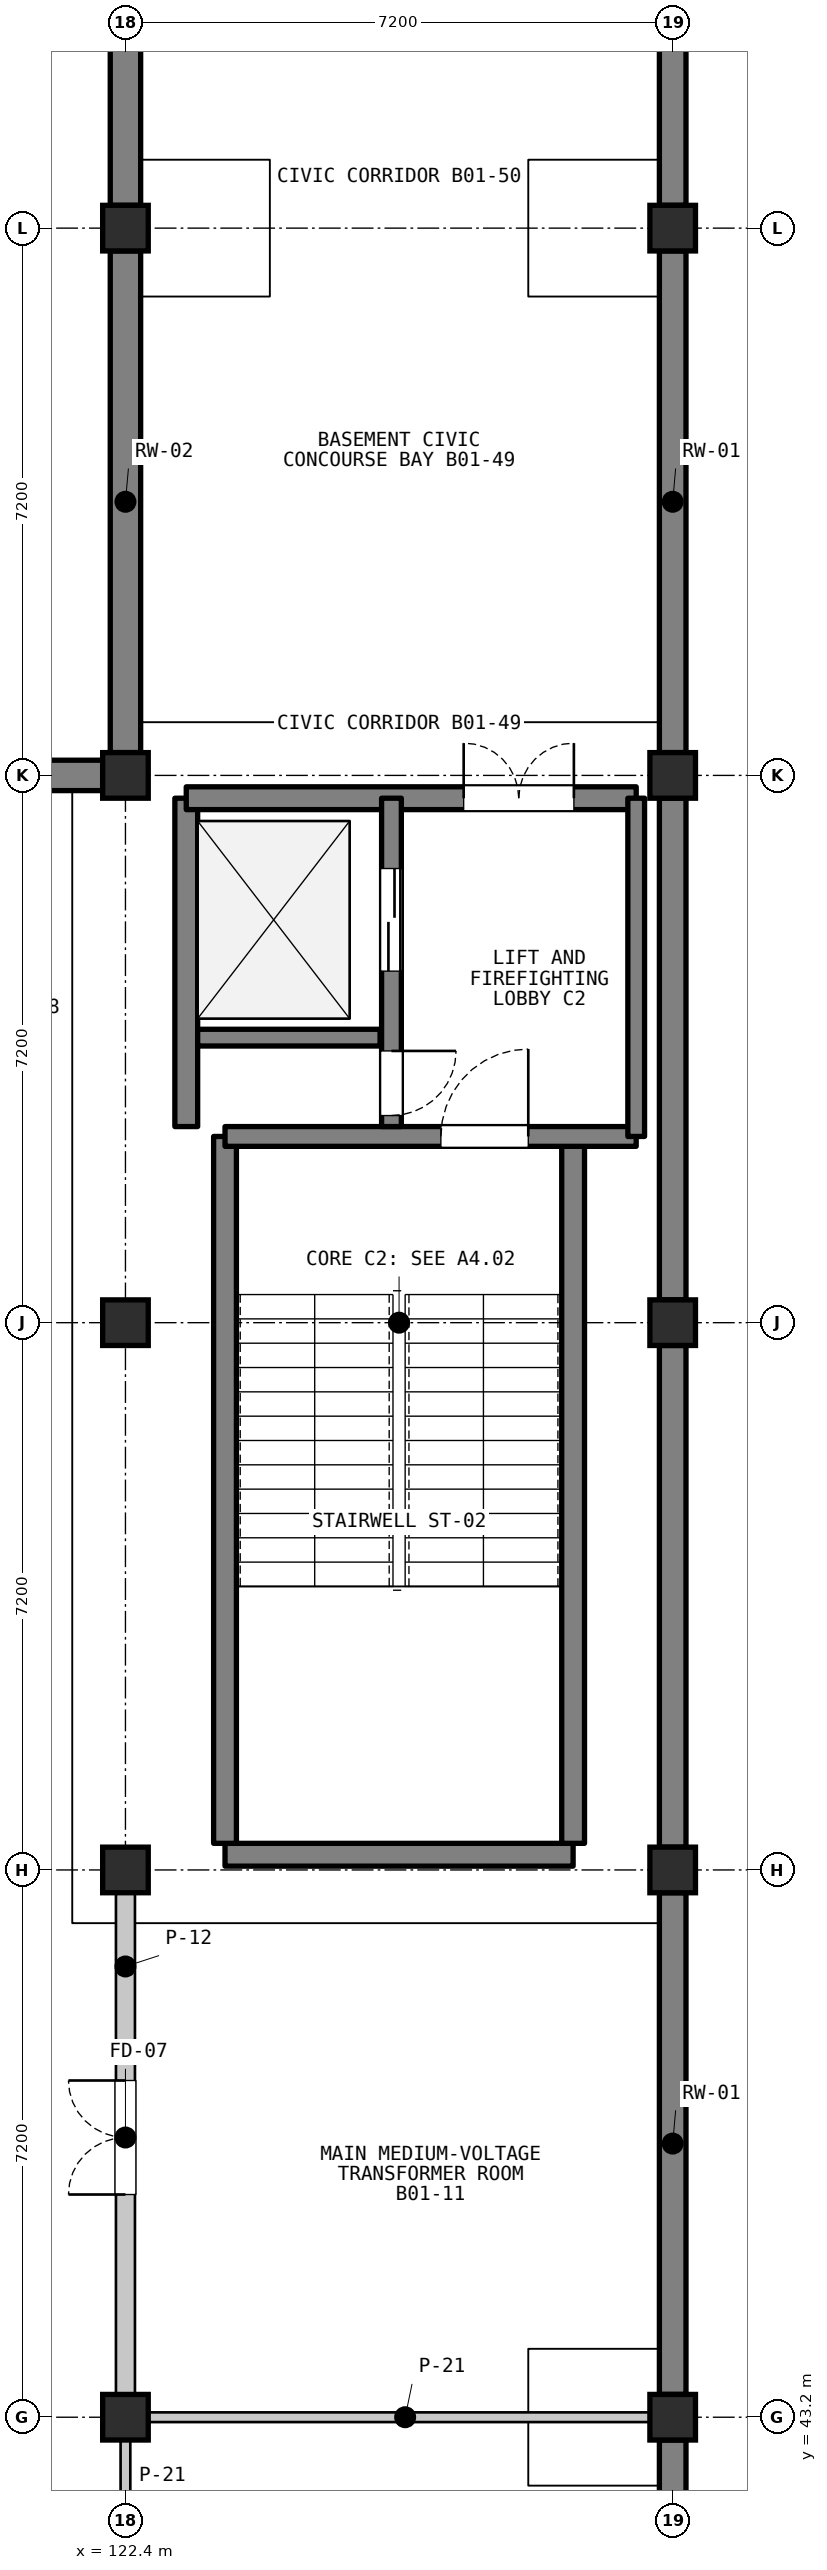
"""IFC4 building model, lengths in metres.
Left out: names, types, materials, properties, quantities, classifications, styles, units other than length and angle.
Written with IfcOpenShell. Run it as: python <this file> out.ifc"""

import sys

from ifc_helpers import new_model, si_unit, direction, frame, frame_2d, origin, origin_2d, place, context, subcontext, project, spatial, rectangle, extrude, element, fill, save


model = new_model("IFC4")
c1 = context("Model", 3, precision=1e-05, world=origin(), true_north=direction((0.0, 1.0)))
c2 = subcontext(c1, "Body", "Model", "MODEL_VIEW")
j1 = project(units=[si_unit("LENGTHUNIT", "METRE"), si_unit("PLANEANGLEUNIT", "RADIAN")], contexts=[c1])
p1 = place(None, origin())
s1 = spatial("IfcSite", under=j1, at=p1, CompositionType="ELEMENT")
p2 = place(p1, origin())
s2 = spatial("IfcBuilding", under=s1, at=p2, CompositionType="ELEMENT")
p3 = place(p2, frame((0.0, 0.0, -4.2)))
s3 = spatial("IfcBuildingStorey", under=s2, at=p3, CompositionType="ELEMENT", Elevation=-4.2)
p4 = place(p3, frame((115.5, 64.8, 0.0), z_axis=(0.0, 0.0, 1.0), x_axis=(1.0, 0.0, 0.0)))
e1 = element("IfcWall", 1, at=p4, inside=s3, PredefinedType="USERDEFINED", context=c2, shape_type="SweptSolid", body=[
    extrude(rectangle(XDim=6.6, YDim=0.4, at=frame_2d((3.3, 0.0))), origin(), (0.0, 0.0, 1.0), 3.98),
])
p5 = place(p3, frame((129.6, 36.3, 0.0), z_axis=(0.0, 0.0, 1.0), x_axis=(0.0, 1.0, 0.0)))
e2 = element("IfcWall", 2, at=p5, inside=s3, PredefinedType="USERDEFINED", context=c2, shape_type="SweptSolid", body=[
    extrude(rectangle(XDim=6.6, YDim=0.35, at=frame_2d((3.3, 0.0))), origin(), (0.0, 0.0, 1.0), 3.98),
])
for number, where, z_axis, x_axis in (
    (3, (129.6, 43.5, 0.0), (0.0, 0.0, 1.0), (0.0, 1.0, 0.0)),
    (4, (129.6, 50.7, 0.0), (0.0, 0.0, 1.0), (0.0, 1.0, 0.0)),
    (5, (129.6, 57.9, 0.0), (0.0, 0.0, 1.0), (0.0, 1.0, 0.0)),
):
    element("IfcWall", number, at=place(p3, frame(where, z_axis=z_axis, x_axis=x_axis)), inside=s3, PredefinedType="USERDEFINED", context=c2, shape_type="SweptSolid", body=[
        extrude(rectangle(XDim=6.6, YDim=0.35, at=frame_2d((3.3, 0.0))), origin(), (0.0, 0.0, 1.0), 3.98),
    ])
p6 = place(p3, frame((122.4, 65.1, 0.0), z_axis=(0.0, 0.0, 1.0), x_axis=(0.0, 1.0, 0.0)))
e6 = element("IfcWall", 6, at=p6, inside=s3, PredefinedType="USERDEFINED", context=c2, shape_type="SweptSolid", body=[
    extrude(rectangle(XDim=6.6, YDim=0.4, at=frame_2d((3.3, 0.0))), origin(), (0.0, 0.0, 1.0), 3.98),
])
p7 = place(p3, frame((129.6, 65.1, 0.0), z_axis=(0.0, 0.0, 1.0), x_axis=(0.0, 1.0, 0.0)))
e7 = element("IfcWall", 7, at=p7, inside=s3, PredefinedType="USERDEFINED", context=c2, shape_type="SweptSolid", body=[
    extrude(rectangle(XDim=6.6, YDim=0.35, at=frame_2d((3.3, 0.0))), origin(), (0.0, 0.0, 1.0), 3.98),
])
p8 = place(p3, frame((122.4, 72.3, 0.0), z_axis=(0.0, 0.0, 1.0), x_axis=(0.0, 1.0, 0.0)))
e8 = element("IfcWall", 8, at=p8, inside=s3, PredefinedType="USERDEFINED", context=c2, shape_type="SweptSolid", body=[
    extrude(rectangle(XDim=6.6, YDim=0.4, at=frame_2d((3.3, 0.0))), origin(), (0.0, 0.0, 1.0), 3.98),
])
p9 = place(p3, frame((129.6, 72.3, 0.0), z_axis=(0.0, 0.0, 1.0), x_axis=(0.0, 1.0, 0.0)))
e9 = element("IfcWall", 9, at=p9, inside=s3, PredefinedType="USERDEFINED", context=c2, shape_type="SweptSolid", body=[
    extrude(rectangle(XDim=6.6, YDim=0.35, at=frame_2d((3.3, 0.0))), origin(), (0.0, 0.0, 1.0), 3.98),
])
for number, where, z_axis, x_axis in (
    (10, (122.4, 43.2, 0.0), (0.0, 0.0, 1.0), (1.0, 0.0, 0.0)),
    (11, (122.4, 50.4, 0.0), (0.0, 0.0, 1.0), (1.0, 0.0, 0.0)),
    (12, (122.4, 57.6, 0.0), (0.0, 0.0, 1.0), (1.0, 0.0, 0.0)),
    (13, (122.4, 64.8, 0.0), (0.0, 0.0, 1.0), (1.0, 0.0, 0.0)),
    (14, (122.4, 72.0, 0.0), (0.0, 0.0, 1.0), (1.0, 0.0, 0.0)),
    (15, (129.6, 43.2, 0.0), (0.0, 0.0, 1.0), (1.0, 0.0, 0.0)),
    (16, (129.6, 50.4, 0.0), (0.0, 0.0, 1.0), (1.0, 0.0, 0.0)),
    (17, (129.6, 57.6, 0.0), (0.0, 0.0, 1.0), (1.0, 0.0, 0.0)),
    (18, (129.6, 64.8, 0.0), (0.0, 0.0, 1.0), (1.0, 0.0, 0.0)),
    (19, (129.6, 72.0, 0.0), (0.0, 0.0, 1.0), (1.0, 0.0, 0.0)),
):
    element("IfcColumn", number, at=place(p3, frame(where, z_axis=z_axis, x_axis=x_axis)), inside=s3, PredefinedType="COLUMN", context=c2, shape_type="SweptSolid", body=[
        extrude(rectangle(XDim=0.6, YDim=0.6, at=origin_2d()), origin(), (0.0, 0.0, 1.0), 4.2),
    ])
p10 = place(p3, frame((123.71, 50.6, 0.0), z_axis=(0.0, 0.0, 1.0), x_axis=(1.0, 0.0, 0.0)))
e20 = element("IfcWall", 20, at=p10, inside=s3, PredefinedType="SHEAR", context=c2, shape_type="SweptSolid", body=[
    extrude(rectangle(XDim=4.58, YDim=0.3, at=frame_2d((2.29, 0.0))), origin(), (0.0, 0.0, 1.0), 3.98),
])
for number, where, z_axis, x_axis in (
    (21, (123.71, 50.75, 0.0), (0.0, 0.0, 1.0), (0.0, 1.0, 0.0)),
    (22, (128.29, 50.75, 0.0), (0.0, 0.0, 1.0), (0.0, 1.0, 0.0)),
):
    element("IfcWall", number, at=place(p3, frame(where, z_axis=z_axis, x_axis=x_axis)), inside=s3, PredefinedType="SHEAR", context=c2, shape_type="SweptSolid", body=[
        extrude(rectangle(XDim=9.3, YDim=0.3, at=frame_2d((4.65, 0.0))), origin(), (0.0, 0.0, 1.0), 3.98),
    ])
p11 = place(p3, frame((123.71, 60.05, 0.0), z_axis=(0.0, 0.0, 1.0), x_axis=(1.0, 0.0, 0.0)))
e23 = element("IfcWall", 23, at=p11, inside=s3, PredefinedType="SHEAR", context=c2, shape_type="SweptSolid", body=[
    extrude(rectangle(XDim=5.41, YDim=0.26, at=frame_2d((2.705, 0.0))), origin(), (0.0, 0.0, 1.0), 3.98),
])
p12 = place(p11, frame((2.84, 0.0, 0.0)))
e24 = element("IfcOpeningElement", 24, at=p12, cuts=e23, PredefinedType="OPENING", context=c2, shape_type="SweptSolid", body=[
    extrude(rectangle(XDim=1.15, YDim=2.15, at=frame_2d((0.575, 1.075))), frame((0.0, 0.14, 0.0), z_axis=(0.0, -1.0, 0.0), x_axis=(1.0, 0.0, 0.0)), (0.0, 0.0, 1.0), 0.28),
])
p13 = place(p3, frame((123.2, 60.18, 0.0), z_axis=(0.0, 0.0, 1.0), x_axis=(0.0, 1.0, 0.0)))
e25 = element("IfcWall", 25, at=p13, inside=s3, PredefinedType="SHEAR", context=c2, shape_type="SweptSolid", body=[
    extrude(rectangle(XDim=4.32, YDim=0.3, at=frame_2d((2.16, 0.0))), origin(), (0.0, 0.0, 1.0), 3.98),
])
p14 = place(p3, frame((123.2, 64.5, 0.0), z_axis=(0.0, 0.0, 1.0), x_axis=(1.0, 0.0, 0.0)))
e26 = element("IfcWall", 26, at=p14, inside=s3, PredefinedType="SHEAR", context=c2, shape_type="SweptSolid", body=[
    extrude(rectangle(XDim=5.92, YDim=0.3, at=frame_2d((2.96, 0.0))), origin(), (0.0, 0.0, 1.0), 3.98),
])
p15 = place(p14, frame((3.65, 0.0, 0.0)))
e27 = element("IfcOpeningElement", 27, at=p15, cuts=e26, PredefinedType="OPENING", context=c2, shape_type="SweptSolid", body=[
    extrude(rectangle(XDim=1.45, YDim=2.2, at=frame_2d((0.725, 1.1))), frame((0.0, 0.16, 0.0), z_axis=(0.0, -1.0, 0.0), x_axis=(1.0, 0.0, 0.0)), (0.0, 0.0, 1.0), 0.32),
])
p16 = place(p3, frame((123.35, 61.35, 0.0), z_axis=(0.0, 0.0, 1.0), x_axis=(1.0, 0.0, 0.0)))
e28 = element("IfcWall", 28, at=p16, inside=s3, PredefinedType="SHEAR", context=c2, shape_type="SweptSolid", body=[
    extrude(rectangle(XDim=2.4, YDim=0.22, at=frame_2d((1.2, 0.0))), origin(), (0.0, 0.0, 1.0), 3.98),
])
p17 = place(p3, frame((125.9, 64.5, 0.0), z_axis=(0.0, 0.0, 1.0), x_axis=(0.0, -1.0, 0.0)))
e29 = element("IfcWall", 29, at=p17, inside=s3, PredefinedType="SHEAR", context=c2, shape_type="SweptSolid", body=[
    extrude(rectangle(XDim=4.32, YDim=0.26, at=frame_2d((2.16, 0.0))), origin(), (0.0, 0.0, 1.0), 3.98),
])
p18 = place(p17, frame((0.925, 0.0, 0.0)))
e30 = element("IfcOpeningElement", 30, at=p18, cuts=e29, PredefinedType="OPENING", context=c2, shape_type="SweptSolid", body=[
    extrude(rectangle(XDim=1.35, YDim=2.2, at=frame_2d((0.675, 1.1))), frame((0.0, 0.14, 0.0), z_axis=(0.0, -1.0, 0.0), x_axis=(1.0, 0.0, 0.0)), (0.0, 0.0, 1.0), 0.28),
])
p19 = place(p17, frame((3.325, 0.0, 0.0)))
e31 = element("IfcOpeningElement", 31, at=p19, cuts=e29, PredefinedType="OPENING", context=c2, shape_type="SweptSolid", body=[
    extrude(rectangle(XDim=0.85, YDim=2.05, at=frame_2d((0.425, 1.025))), frame((0.0, 0.14, 0.0), z_axis=(0.0, -1.0, 0.0), x_axis=(1.0, 0.0, 0.0)), (0.0, 0.0, 1.0), 0.28),
])
p20 = place(p3, frame((129.12, 64.5, 0.0), z_axis=(0.0, 0.0, 1.0), x_axis=(0.0, -1.0, 0.0)))
e32 = element("IfcWall", 32, at=p20, inside=s3, PredefinedType="SHEAR", context=c2, shape_type="SweptSolid", body=[
    extrude(rectangle(XDim=4.45, YDim=0.22, at=frame_2d((2.225, 0.0))), origin(), (0.0, 0.0, 1.0), 3.98),
])
p21 = place(p3, frame((122.4, 36.12, 0.0), z_axis=(0.0, 0.0, 1.0), x_axis=(0.0, 1.0, 0.0)))
e33 = element("IfcWall", 33, at=p21, inside=s3, PredefinedType="PARTITIONING", context=c2, shape_type="SweptSolid", body=[
    extrude(rectangle(XDim=6.8, YDim=0.128, at=frame_2d((3.4, 0.0))), origin(), (0.0, 0.0, 1.0), 3.208),
])
p22 = place(p21, frame((2.84, 0.0, 0.0)))
e34 = element("IfcOpeningElement", 34, at=p22, cuts=e33, PredefinedType="OPENING", context=c2, shape_type="SweptSolid", body=[
    extrude(rectangle(XDim=1.12, YDim=2.15, at=frame_2d((0.56, 1.075))), frame((0.0, 0.074, 0.0), z_axis=(0.0, -1.0, 0.0), x_axis=(1.0, 0.0, 0.0)), (0.0, 0.0, 1.0), 0.148),
])
p23 = place(p21, frame((0.45, 0.0, 1.05)))
e35 = element("IfcOpeningElement", 35, at=p23, cuts=e33, PredefinedType="OPENING", context=c2, shape_type="SweptSolid", body=[
    extrude(rectangle(XDim=1.28, YDim=1.44, at=frame_2d((0.64, 0.72))), frame((0.0, 0.074, 0.0), z_axis=(0.0, -1.0, 0.0), x_axis=(1.0, 0.0, 0.0)), (0.0, 0.0, 1.0), 0.148),
])
p24 = place(p3, frame((122.68, 43.2, 0.0), z_axis=(0.0, 0.0, 1.0), x_axis=(1.0, 0.0, 0.0)))
e36 = element("IfcWall", 36, at=p24, inside=s3, PredefinedType="PARTITIONING", context=c2, shape_type="SweptSolid", body=[
    extrude(rectangle(XDim=6.8, YDim=0.128, at=frame_2d((3.4, 0.0))), origin(), (0.0, 0.0, 1.0), 3.208),
])
p25 = place(p3, frame((122.4, 43.48, 0.0), z_axis=(0.0, 0.0, 1.0), x_axis=(0.0, 1.0, 0.0)))
e37 = element("IfcWall", 37, at=p25, inside=s3, PredefinedType="PARTITIONING", context=c2, shape_type="SweptSolid", body=[
    extrude(rectangle(XDim=6.8, YDim=0.25, at=frame_2d((3.4, 0.0))), origin(), (0.0, 0.0, 1.0), 3.208),
])
p26 = place(p25, frame((2.65, 0.0, 0.0)))
e38 = element("IfcOpeningElement", 38, at=p26, cuts=e37, PredefinedType="OPENING", context=c2, shape_type="SweptSolid", body=[
    extrude(rectangle(XDim=1.5, YDim=2.25, at=frame_2d((0.75, 1.125))), frame((0.0, 0.135, 0.0), z_axis=(0.0, -1.0, 0.0), x_axis=(1.0, 0.0, 0.0)), (0.0, 0.0, 1.0), 0.27),
])
p27 = place(p12, origin())
e39 = element("IfcDoor", 39, at=p27, inside=s3, OperationType="SINGLE_SWING_RIGHT", PredefinedType="DOOR", context=c2, shape_type="SweptSolid", body=[
    extrude(rectangle(XDim=1.15, YDim=2.15, at=frame_2d((0.575, 1.075))), frame((0.0, 0.025, 0.0), z_axis=(0.0, -1.0, 0.0), x_axis=(1.0, 0.0, 0.0)), (0.0, 0.0, 1.0), 0.05),
])
fill(e24, e39)
p28 = place(p18, origin())
e40 = element("IfcDoor", 40, at=p28, inside=s3, OperationType="DOUBLE_DOOR_SLIDING", PredefinedType="DOOR", context=c2, shape_type="SweptSolid", body=[
    extrude(rectangle(XDim=1.35, YDim=2.2, at=frame_2d((0.675, 1.1))), frame((0.0, 0.025, 0.0), z_axis=(0.0, -1.0, 0.0), x_axis=(1.0, 0.0, 0.0)), (0.0, 0.0, 1.0), 0.05),
])
fill(e30, e40)
p29 = place(p19, origin())
e41 = element("IfcDoor", 41, at=p29, inside=s3, OperationType="SINGLE_SWING_LEFT", PredefinedType="DOOR", context=c2, shape_type="SweptSolid", body=[
    extrude(rectangle(XDim=0.85, YDim=2.05, at=frame_2d((0.425, 1.025))), frame((0.0, 0.025, 0.0), z_axis=(0.0, -1.0, 0.0), x_axis=(1.0, 0.0, 0.0)), (0.0, 0.0, 1.0), 0.05),
])
fill(e31, e41)
p30 = place(p15, origin())
e42 = element("IfcDoor", 42, at=p30, inside=s3, OperationType="DOUBLE_DOOR_SINGLE_SWING", PredefinedType="DOOR", context=c2, shape_type="SweptSolid", body=[
    extrude(rectangle(XDim=1.45, YDim=2.2, at=frame_2d((0.725, 1.1))), frame((0.0, 0.025, 0.0), z_axis=(0.0, -1.0, 0.0), x_axis=(1.0, 0.0, 0.0)), (0.0, 0.0, 1.0), 0.05),
])
fill(e27, e42)
p31 = place(p26, origin())
e43 = element("IfcDoor", 43, at=p31, inside=s3, OperationType="DOUBLE_DOOR_SINGLE_SWING", PredefinedType="DOOR", context=c2, shape_type="SweptSolid", body=[
    extrude(rectangle(XDim=1.5, YDim=2.25, at=frame_2d((0.75, 1.125))), frame((0.0, 0.025, 0.0), z_axis=(0.0, -1.0, 0.0), x_axis=(1.0, 0.0, 0.0)), (0.0, 0.0, 1.0), 0.05),
])
fill(e38, e43)
save(model, sys.argv[1])
